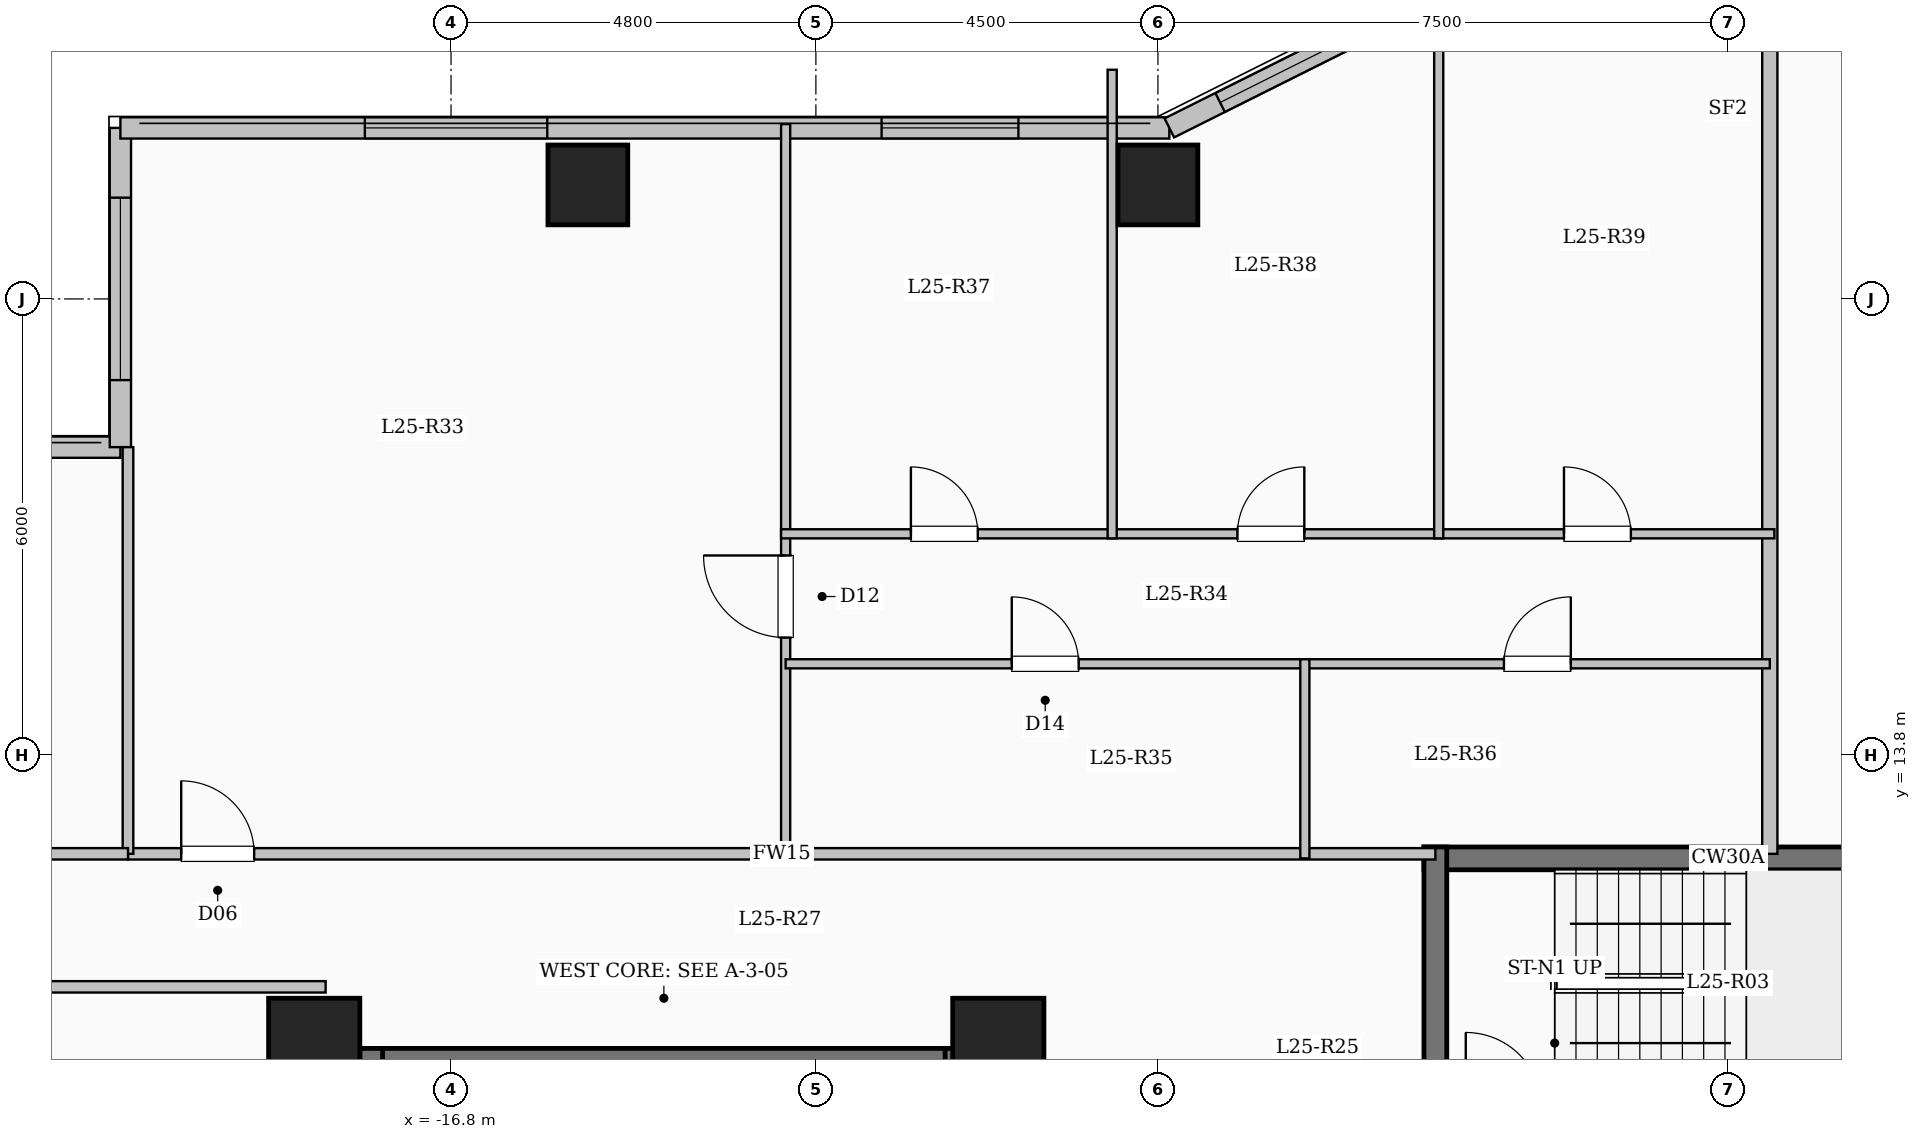
"""IFC4 building model, lengths in metres.
Left out: names, types, materials, properties, quantities, classifications, styles, units other than length and angle.
Written with IfcOpenShell. Run it as: python <this file> out.ifc"""

import sys

from ifc_helpers import new_model, si_unit, direction, frame, frame_2d, origin, origin_2d, place, context, subcontext, project, spatial, rectangle, extrude, element, fill, save


model = new_model("IFC4")
c1 = context("Model", 3, precision=1e-05, world=origin(), true_north=direction((0.0, 1.0)))
c2 = subcontext(c1, "Body", "Model", "MODEL_VIEW")
j1 = project(units=[si_unit("LENGTHUNIT", "METRE"), si_unit("PLANEANGLEUNIT", "RADIAN")], contexts=[c1])
p1 = place(None, origin())
s1 = spatial("IfcSite", under=j1, at=p1, CompositionType="ELEMENT")
p2 = place(p1, origin())
s2 = spatial("IfcBuilding", under=s1, at=p2, CompositionType="ELEMENT")
p3 = place(p2, frame((0.0, 0.0, 95.05)))
s3 = spatial("IfcBuildingStorey", under=s2, at=p3, CompositionType="ELEMENT", Elevation=95.05)
for number, where, z_axis, x_axis in (
    (1, (-9.6, 10.0, 0.0), (0.0, 0.0, 1.0), (1.0, 0.0, 0.0)),
    (2, (-18.6, 10.0, 0.0), (0.0, 0.0, 1.0), (1.0, 0.0, 0.0)),
):
    element("IfcColumn", number, at=place(p3, frame(where, z_axis=z_axis, x_axis=x_axis)), inside=s3, PredefinedType="COLUMN", context=c2, shape_type="SweptSolid", body=[
        extrude(rectangle(XDim=1.2, YDim=1.2, at=origin_2d()), origin(), (0.0, 0.0, 1.0), 3.35),
    ])
for number, where, z_axis, x_axis in (
    (3, (-15.0, 21.3, 0.0), (0.0, 0.0, 1.0), (1.0, 0.0, 0.0)),
    (4, (-7.5, 21.3, 0.0), (0.0, 0.0, 1.0), (1.0, 0.0, 0.0)),
):
    element("IfcColumn", number, at=place(p3, frame(where, z_axis=z_axis, x_axis=x_axis)), inside=s3, PredefinedType="COLUMN", context=c2, shape_type="SweptSolid", body=[
        extrude(rectangle(XDim=1.05, YDim=1.05, at=origin_2d()), origin(), (0.0, 0.0, 1.0), 3.35),
    ])
p4 = place(p3, frame((-26.85, 17.85, 0.0), z_axis=(0.0, 0.0, 1.0), x_axis=(1.0, 0.0, 0.0)))
e5 = element("IfcWall", 5, at=p4, inside=s3, PredefinedType="SOLIDWALL", context=c2, shape_type="SweptSolid", body=[
    extrude(rectangle(XDim=5.7, YDim=0.28, at=frame_2d((2.85, 0.0))), origin(), (0.0, 0.0, 1.0), 3.1),
])
p5 = place(p4, frame((1.875, 0.0, 0.9)))
e6 = element("IfcOpeningElement", 6, at=p5, cuts=e5, PredefinedType="OPENING", context=c2, shape_type="SweptSolid", body=[
    extrude(rectangle(XDim=2.0, YDim=1.7, at=frame_2d((1.0, 0.85))), frame((0.0, 0.15, 0.0), z_axis=(0.0, -1.0, 0.0), x_axis=(1.0, 0.0, 0.0)), (0.0, 0.0, 1.0), 0.3),
])
p6 = place(p3, frame((-21.15, 17.85, 0.0), z_axis=(0.0, 0.0, 1.0), x_axis=(0.0, 1.0, 0.0)))
e7 = element("IfcWall", 7, at=p6, inside=s3, PredefinedType="SOLIDWALL", context=c2, shape_type="SweptSolid", body=[
    extrude(rectangle(XDim=4.2, YDim=0.28, at=frame_2d((2.1, 0.0))), origin(), (0.0, 0.0, 1.0), 3.1),
])
p7 = place(p6, frame((0.882, 0.0, 0.9)))
e8 = element("IfcOpeningElement", 8, at=p7, cuts=e7, PredefinedType="OPENING", context=c2, shape_type="SweptSolid", body=[
    extrude(rectangle(XDim=2.4, YDim=1.8, at=frame_2d((1.2, 0.9))), frame((0.0, 0.15, 0.0), z_axis=(0.0, -1.0, 0.0), x_axis=(1.0, 0.0, 0.0)), (0.0, 0.0, 1.0), 0.3),
])
p8 = place(p3, frame((-21.15, 22.05, 0.0), z_axis=(0.0, 0.0, 1.0), x_axis=(1.0, 0.0, 0.0)))
e9 = element("IfcWall", 9, at=p8, inside=s3, PredefinedType="SOLIDWALL", context=c2, shape_type="SweptSolid", body=[
    extrude(rectangle(XDim=13.8, YDim=0.28, at=frame_2d((6.9, 0.0))), origin(), (0.0, 0.0, 1.0), 3.1),
])
p9 = place(p8, frame((3.216, 0.0, 0.9)))
e10 = element("IfcOpeningElement", 10, at=p9, cuts=e9, PredefinedType="OPENING", context=c2, shape_type="SweptSolid", body=[
    extrude(rectangle(XDim=2.4, YDim=1.8, at=frame_2d((1.2, 0.9))), frame((0.0, 0.15, 0.0), z_axis=(0.0, -1.0, 0.0), x_axis=(1.0, 0.0, 0.0)), (0.0, 0.0, 1.0), 0.3),
])
p10 = place(p8, frame((10.014, 0.0, 0.9)))
e11 = element("IfcOpeningElement", 11, at=p10, cuts=e9, PredefinedType="OPENING", context=c2, shape_type="SweptSolid", body=[
    extrude(rectangle(XDim=1.8, YDim=1.65, at=frame_2d((0.9, 0.825))), frame((0.0, 0.15, 0.0), z_axis=(0.0, -1.0, 0.0), x_axis=(1.0, 0.0, 0.0)), (0.0, 0.0, 1.0), 0.3),
])
p11 = place(p3, frame((-7.35, 22.05, 0.0), z_axis=(0.0, 0.0, 1.0), x_axis=(0.894427191, 0.4472135955, 0.0)))
e12 = element("IfcWall", 12, at=p11, inside=s3, PredefinedType="SOLIDWALL", context=c2, shape_type="SweptSolid", body=[
    extrude(rectangle(XDim=3.354, YDim=0.28, at=frame_2d((1.677, 0.0))), origin(), (0.0, 0.0, 1.0), 3.1),
])
p12 = place(p11, frame((0.747, 0.0, 0.9)))
e13 = element("IfcOpeningElement", 13, at=p12, cuts=e12, PredefinedType="OPENING", context=c2, shape_type="SweptSolid", body=[
    extrude(rectangle(XDim=1.8, YDim=1.65, at=frame_2d((0.9, 0.825))), frame((0.0, 0.15, 0.0), z_axis=(0.0, -1.0, 0.0), x_axis=(1.0, 0.0, 0.0)), (0.0, 0.0, 1.0), 0.3),
])
p13 = place(p3, frame((-18.0, 9.79, 0.0), z_axis=(0.0, 0.0, 1.0), x_axis=(1.0, 0.0, 0.0)))
e14 = element("IfcWall", 14, at=p13, inside=s3, PredefinedType="SHEAR", context=c2, shape_type="SweptSolid", body=[
    extrude(rectangle(XDim=8.0, YDim=0.3, at=frame_2d((4.0, 0.0))), origin(), (0.0, 0.0, 1.0), 3.35),
])
for number, where, z_axis, x_axis in (
    (15, (-17.85, 6.35, 0.0), (0.0, 0.0, 1.0), (0.0, 1.0, 0.0)),
    (16, (-10.15, 6.35, 0.0), (0.0, 0.0, 1.0), (0.0, 1.0, 0.0)),
):
    element("IfcWall", number, at=place(p3, frame(where, z_axis=z_axis, x_axis=x_axis)), inside=s3, PredefinedType="SHEAR", context=c2, shape_type="SweptSolid", body=[
        extrude(rectangle(XDim=3.59, YDim=0.3, at=frame_2d((1.795, 0.0))), origin(), (0.0, 0.0, 1.0), 3.35),
    ])
p14 = place(p3, frame((-4.0, 12.44, 0.0), z_axis=(0.0, 0.0, 1.0), x_axis=(1.0, 0.0, 0.0)))
e17 = element("IfcWall", 17, at=p14, inside=s3, PredefinedType="SHEAR", context=c2, shape_type="SweptSolid", body=[
    extrude(rectangle(XDim=8.0, YDim=0.3, at=frame_2d((4.0, 0.0))), origin(), (0.0, 0.0, 1.0), 3.35),
])
p15 = place(p3, frame((-3.85, 9.0, 0.0), z_axis=(0.0, 0.0, 1.0), x_axis=(0.0, 1.0, 0.0)))
e18 = element("IfcWall", 18, at=p15, inside=s3, PredefinedType="SHEAR", context=c2, shape_type="SweptSolid", body=[
    extrude(rectangle(XDim=3.59, YDim=0.3, at=frame_2d((1.795, 0.0))), origin(), (0.0, 0.0, 1.0), 3.35),
])
p16 = place(p3, frame((-21.05, 12.5, 0.0), z_axis=(0.0, 0.0, 1.0), x_axis=(1.0, 0.0, 0.0)))
e19 = element("IfcWall", 19, at=p16, inside=s3, PredefinedType="PARTITIONING", context=c2, shape_type="SweptSolid", body=[
    extrude(rectangle(XDim=17.2, YDim=0.15, at=frame_2d((8.6, 0.0))), origin(), (0.0, 0.0, 1.0), 3.1),
])
p17 = place(p16, frame((0.7, 0.0, 0.0)))
e20 = element("IfcOpeningElement", 20, at=p17, cuts=e19, PredefinedType="OPENING", context=c2, shape_type="SweptSolid", body=[
    extrude(rectangle(XDim=0.96, YDim=2.15, at=frame_2d((0.48, 1.075))), frame((0.0, 0.085, 0.0), z_axis=(0.0, -1.0, 0.0), x_axis=(1.0, 0.0, 0.0)), (0.0, 0.0, 1.0), 0.17),
])
p18 = place(p3, frame((0.55, 12.5, 0.0), z_axis=(0.0, 0.0, 1.0), x_axis=(0.0, 1.0, 0.0)))
e21 = element("IfcWall", 21, at=p18, inside=s3, PredefinedType="SOLIDWALL", context=c2, shape_type="SweptSolid", body=[
    extrude(rectangle(XDim=11.08, YDim=0.2, at=frame_2d((5.54, 0.0))), origin(), (0.0, 0.0, 1.0), 3.1),
])
p19 = place(p3, frame((-12.398, 12.44, 0.0), z_axis=(0.0, 0.0, 1.0), x_axis=(0.0, 1.0, 0.0)))
e22 = element("IfcWall", 22, at=p19, inside=s3, PredefinedType="PARTITIONING", context=c2, shape_type="SweptSolid", body=[
    extrude(rectangle(XDim=9.66, YDim=0.12, at=frame_2d((4.83, 0.0))), origin(), (0.0, 0.0, 1.0), 3.1),
])
p20 = place(p19, frame((2.905, 0.0, 0.0)))
e23 = element("IfcOpeningElement", 23, at=p20, cuts=e22, PredefinedType="OPENING", context=c2, shape_type="SweptSolid", body=[
    extrude(rectangle(XDim=1.08, YDim=2.15, at=frame_2d((0.54, 1.075))), frame((0.0, 0.07, 0.0), z_axis=(0.0, -1.0, 0.0), x_axis=(1.0, 0.0, 0.0)), (0.0, 0.0, 1.0), 0.14),
])
p21 = place(p3, frame((-12.398, 15.0, 0.0), z_axis=(0.0, 0.0, 1.0), x_axis=(1.0, 0.0, 0.0)))
e24 = element("IfcWall", 24, at=p21, inside=s3, PredefinedType="PARTITIONING", context=c2, shape_type="SweptSolid", body=[
    extrude(rectangle(XDim=6.831, YDim=0.12, at=frame_2d((3.416, 0.0))), origin(), (0.0, 0.0, 1.0), 3.1),
])
p22 = place(p21, frame((2.975, 0.0, 0.0)))
e25 = element("IfcOpeningElement", 25, at=p22, cuts=e24, PredefinedType="OPENING", context=c2, shape_type="SweptSolid", body=[
    extrude(rectangle(XDim=0.88, YDim=2.1, at=frame_2d((0.44, 1.05))), frame((0.0, 0.07, 0.0), z_axis=(0.0, -1.0, 0.0), x_axis=(1.0, 0.0, 0.0)), (0.0, 0.0, 1.0), 0.14),
])
p23 = place(p3, frame((-5.567, 15.0, 0.0), z_axis=(0.0, 0.0, 1.0), x_axis=(1.0, 0.0, 0.0)))
e26 = element("IfcWall", 26, at=p23, inside=s3, PredefinedType="PARTITIONING", context=c2, shape_type="SweptSolid", body=[
    extrude(rectangle(XDim=6.117, YDim=0.12, at=frame_2d((3.059, 0.0))), origin(), (0.0, 0.0, 1.0), 3.1),
])
p24 = place(p23, frame((2.619, 0.0, 0.0)))
e27 = element("IfcOpeningElement", 27, at=p24, cuts=e26, PredefinedType="OPENING", context=c2, shape_type="SweptSolid", body=[
    extrude(rectangle(XDim=0.88, YDim=2.1, at=frame_2d((0.44, 1.05))), frame((0.0, 0.07, 0.0), z_axis=(0.0, -1.0, 0.0), x_axis=(1.0, 0.0, 0.0)), (0.0, 0.0, 1.0), 0.14),
])
p25 = place(p3, frame((-12.458, 16.71, 0.0), z_axis=(0.0, 0.0, 1.0), x_axis=(1.0, 0.0, 0.0)))
e28 = element("IfcWall", 28, at=p25, inside=s3, PredefinedType="PARTITIONING", context=c2, shape_type="SweptSolid", body=[
    extrude(rectangle(XDim=13.068, YDim=0.12, at=frame_2d((6.534, 0.0))), origin(), (0.0, 0.0, 1.0), 3.1),
])
p26 = place(p25, frame((1.708, 0.0, 0.0)))
e29 = element("IfcOpeningElement", 29, at=p26, cuts=e28, PredefinedType="OPENING", context=c2, shape_type="SweptSolid", body=[
    extrude(rectangle(XDim=0.88, YDim=2.1, at=frame_2d((0.44, 1.05))), frame((0.0, 0.07, 0.0), z_axis=(0.0, -1.0, 0.0), x_axis=(1.0, 0.0, 0.0)), (0.0, 0.0, 1.0), 0.14),
])
p27 = place(p25, frame((6.004, 0.0, 0.0)))
e30 = element("IfcOpeningElement", 30, at=p27, cuts=e28, PredefinedType="OPENING", context=c2, shape_type="SweptSolid", body=[
    extrude(rectangle(XDim=0.88, YDim=2.1, at=frame_2d((0.44, 1.05))), frame((0.0, 0.07, 0.0), z_axis=(0.0, -1.0, 0.0), x_axis=(1.0, 0.0, 0.0)), (0.0, 0.0, 1.0), 0.14),
])
p28 = place(p25, frame((10.3, 0.0, 0.0)))
e31 = element("IfcOpeningElement", 31, at=p28, cuts=e28, PredefinedType="OPENING", context=c2, shape_type="SweptSolid", body=[
    extrude(rectangle(XDim=0.88, YDim=2.1, at=frame_2d((0.44, 1.05))), frame((0.0, 0.07, 0.0), z_axis=(0.0, -1.0, 0.0), x_axis=(1.0, 0.0, 0.0)), (0.0, 0.0, 1.0), 0.14),
])
p29 = place(p3, frame((-5.567, 12.44, 0.0), z_axis=(0.0, 0.0, 1.0), x_axis=(0.0, 1.0, 0.0)))
e32 = element("IfcWall", 32, at=p29, inside=s3, PredefinedType="PARTITIONING", context=c2, shape_type="SweptSolid", body=[
    extrude(rectangle(XDim=2.62, YDim=0.12, at=frame_2d((1.31, 0.0))), origin(), (0.0, 0.0, 1.0), 3.1),
])
p30 = place(p3, frame((-8.102, 16.65, 0.0), z_axis=(0.0, 0.0, 1.0), x_axis=(0.0, 1.0, 0.0)))
e33 = element("IfcWall", 33, at=p30, inside=s3, PredefinedType="PARTITIONING", context=c2, shape_type="SweptSolid", body=[
    extrude(rectangle(XDim=6.165, YDim=0.12, at=frame_2d((3.083, 0.0))), origin(), (0.0, 0.0, 1.0), 2.435),
])
p31 = place(p3, frame((-3.806, 16.65, 0.0), z_axis=(0.0, 0.0, 1.0), x_axis=(0.0, 1.0, 0.0)))
e34 = element("IfcWall", 34, at=p31, inside=s3, PredefinedType="PARTITIONING", context=c2, shape_type="SweptSolid", body=[
    extrude(rectangle(XDim=6.93, YDim=0.12, at=frame_2d((3.465, 0.0))), origin(), (0.0, 0.0, 1.0), 3.1),
])
p32 = place(p3, frame((-26.88, 10.75, 0.0), z_axis=(0.0, 0.0, 1.0), x_axis=(1.0, 0.0, 0.0)))
e35 = element("IfcWall", 35, at=p32, inside=s3, PredefinedType="PARTITIONING", context=c2, shape_type="SweptSolid", body=[
    extrude(rectangle(XDim=8.43, YDim=0.15, at=frame_2d((4.215, 0.0))), origin(), (0.0, 0.0, 1.0), 3.1),
])
p33 = place(p3, frame((-21.05, 12.5, 0.0), z_axis=(0.0, 0.0, 1.0), x_axis=(0.0, 1.0, 0.0)))
e36 = element("IfcWall", 36, at=p33, inside=s3, PredefinedType="PARTITIONING", context=c2, shape_type="SweptSolid", body=[
    extrude(rectangle(XDim=5.35, YDim=0.14, at=frame_2d((2.675, 0.0))), origin(), (0.0, 0.0, 1.0), 3.1),
])
p34 = place(p3, frame((-26.88, 12.5, 0.0), z_axis=(0.0, 0.0, 1.0), x_axis=(1.0, 0.0, 0.0)))
e37 = element("IfcWall", 37, at=p34, inside=s3, PredefinedType="PARTITIONING", context=c2, shape_type="SweptSolid", body=[
    extrude(rectangle(XDim=5.83, YDim=0.15, at=frame_2d((2.915, 0.0))), origin(), (0.0, 0.0, 1.0), 3.1),
])
p35 = place(p34, frame((2.44, 0.0, 0.0)))
e38 = element("IfcOpeningElement", 38, at=p35, cuts=e37, PredefinedType="OPENING", context=c2, shape_type="SweptSolid", body=[
    extrude(rectangle(XDim=0.95, YDim=2.15, at=frame_2d((0.475, 1.075))), frame((0.0, 0.085, 0.0), z_axis=(0.0, -1.0, 0.0), x_axis=(1.0, 0.0, 0.0)), (0.0, 0.0, 1.0), 0.17),
])
p36 = place(p7, origin())
e39 = element("IfcWindow", 39, at=p36, inside=s3, PartitioningType="SINGLE_PANEL", PredefinedType="WINDOW", context=c2, shape_type="SweptSolid", body=[
    extrude(rectangle(XDim=2.4, YDim=1.8, at=frame_2d((1.2, 0.9))), frame((0.0, 0.03, 0.0), z_axis=(0.0, -1.0, 0.0), x_axis=(1.0, 0.0, 0.0)), (0.0, 0.0, 1.0), 0.06),
])
fill(e8, e39)
p37 = place(p9, origin())
e40 = element("IfcWindow", 40, at=p37, inside=s3, PartitioningType="SINGLE_PANEL", PredefinedType="WINDOW", context=c2, shape_type="SweptSolid", body=[
    extrude(rectangle(XDim=2.4, YDim=1.8, at=frame_2d((1.2, 0.9))), frame((0.0, 0.03, 0.0), z_axis=(0.0, -1.0, 0.0), x_axis=(1.0, 0.0, 0.0)), (0.0, 0.0, 1.0), 0.06),
])
fill(e10, e40)
p38 = place(p10, origin())
e41 = element("IfcWindow", 41, at=p38, inside=s3, PartitioningType="SINGLE_PANEL", PredefinedType="WINDOW", context=c2, shape_type="SweptSolid", body=[
    extrude(rectangle(XDim=1.8, YDim=1.65, at=frame_2d((0.9, 0.825))), frame((0.0, 0.03, 0.0), z_axis=(0.0, -1.0, 0.0), x_axis=(1.0, 0.0, 0.0)), (0.0, 0.0, 1.0), 0.06),
])
fill(e11, e41)
p39 = place(p12, origin())
e42 = element("IfcWindow", 42, at=p39, inside=s3, PartitioningType="SINGLE_PANEL", PredefinedType="WINDOW", context=c2, shape_type="SweptSolid", body=[
    extrude(rectangle(XDim=1.8, YDim=1.65, at=frame_2d((0.9, 0.825))), frame((0.0, 0.03, 0.0), z_axis=(0.0, -1.0, 0.0), x_axis=(1.0, 0.0, 0.0)), (0.0, 0.0, 1.0), 0.06),
])
fill(e13, e42)
p40 = place(p17, origin())
e43 = element("IfcDoor", 43, at=p40, inside=s3, OperationType="SINGLE_SWING_LEFT", PredefinedType="DOOR", context=c2, shape_type="SweptSolid", body=[
    extrude(rectangle(XDim=0.96, YDim=2.15, at=frame_2d((0.48, 1.075))), frame((0.0, 0.025, 0.0), z_axis=(0.0, -1.0, 0.0), x_axis=(1.0, 0.0, 0.0)), (0.0, 0.0, 1.0), 0.05),
])
fill(e20, e43)
p41 = place(p20, origin())
e44 = element("IfcDoor", 44, at=p41, inside=s3, OperationType="SINGLE_SWING_RIGHT", PredefinedType="DOOR", context=c2, shape_type="SweptSolid", body=[
    extrude(rectangle(XDim=1.08, YDim=2.15, at=frame_2d((0.54, 1.075))), frame((0.0, 0.025, 0.0), z_axis=(0.0, -1.0, 0.0), x_axis=(1.0, 0.0, 0.0)), (0.0, 0.0, 1.0), 0.05),
])
fill(e23, e44)
p42 = place(p22, origin())
e45 = element("IfcDoor", 45, at=p42, inside=s3, OperationType="SINGLE_SWING_LEFT", PredefinedType="DOOR", context=c2, shape_type="SweptSolid", body=[
    extrude(rectangle(XDim=0.88, YDim=2.1, at=frame_2d((0.44, 1.05))), frame((0.0, 0.025, 0.0), z_axis=(0.0, -1.0, 0.0), x_axis=(1.0, 0.0, 0.0)), (0.0, 0.0, 1.0), 0.05),
])
fill(e25, e45)
p43 = place(p24, origin())
e46 = element("IfcDoor", 46, at=p43, inside=s3, OperationType="SINGLE_SWING_RIGHT", PredefinedType="DOOR", context=c2, shape_type="SweptSolid", body=[
    extrude(rectangle(XDim=0.88, YDim=2.1, at=frame_2d((0.44, 1.05))), frame((0.0, 0.025, 0.0), z_axis=(0.0, -1.0, 0.0), x_axis=(1.0, 0.0, 0.0)), (0.0, 0.0, 1.0), 0.05),
])
fill(e27, e46)
p44 = place(p26, origin())
e47 = element("IfcDoor", 47, at=p44, inside=s3, OperationType="SINGLE_SWING_LEFT", PredefinedType="DOOR", context=c2, shape_type="SweptSolid", body=[
    extrude(rectangle(XDim=0.88, YDim=2.1, at=frame_2d((0.44, 1.05))), frame((0.0, 0.025, 0.0), z_axis=(0.0, -1.0, 0.0), x_axis=(1.0, 0.0, 0.0)), (0.0, 0.0, 1.0), 0.05),
])
fill(e29, e47)
p45 = place(p27, origin())
e48 = element("IfcDoor", 48, at=p45, inside=s3, OperationType="SINGLE_SWING_RIGHT", PredefinedType="DOOR", context=c2, shape_type="SweptSolid", body=[
    extrude(rectangle(XDim=0.88, YDim=2.1, at=frame_2d((0.44, 1.05))), frame((0.0, 0.025, 0.0), z_axis=(0.0, -1.0, 0.0), x_axis=(1.0, 0.0, 0.0)), (0.0, 0.0, 1.0), 0.05),
])
fill(e30, e48)
p46 = place(p28, origin())
e49 = element("IfcDoor", 49, at=p46, inside=s3, OperationType="SINGLE_SWING_LEFT", PredefinedType="DOOR", context=c2, shape_type="SweptSolid", body=[
    extrude(rectangle(XDim=0.88, YDim=2.1, at=frame_2d((0.44, 1.05))), frame((0.0, 0.025, 0.0), z_axis=(0.0, -1.0, 0.0), x_axis=(1.0, 0.0, 0.0)), (0.0, 0.0, 1.0), 0.05),
])
fill(e31, e49)
save(model, sys.argv[1])
